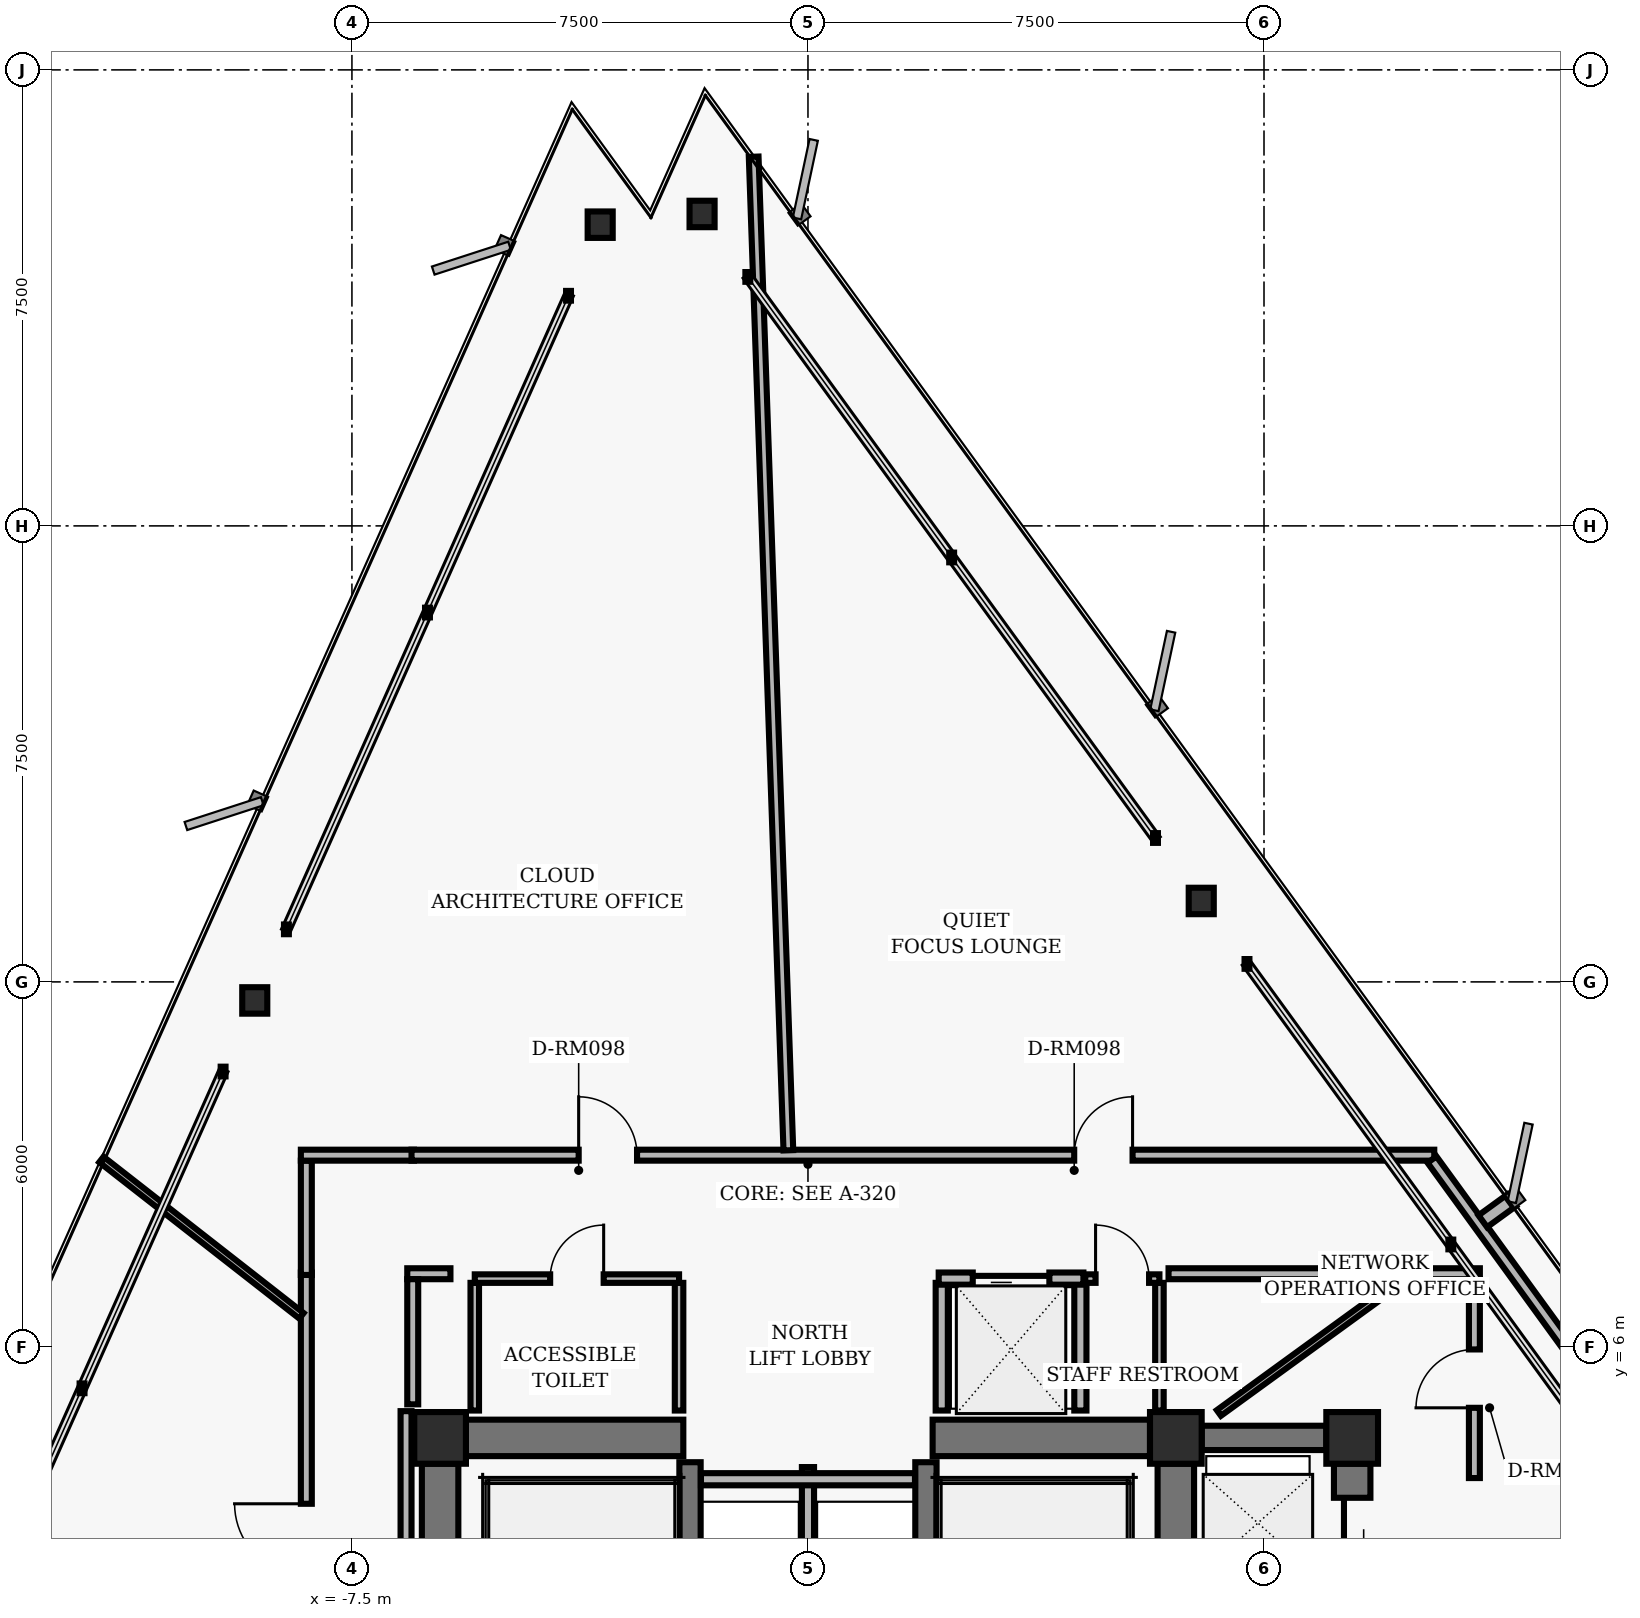
"""IFC4 building model, lengths in metres.
Left out: names, types, materials, properties, quantities, classifications, styles, units other than length and angle.
Written with IfcOpenShell. Run it as: python <this file> out.ifc"""

import sys

from ifc_helpers import new_model, si_unit, direction, frame, frame_2d, origin, origin_2d, place, context, subcontext, project, spatial, rectangle, hollow_rectangle, i_section, extrude, element, fill, save


model = new_model("IFC4")
c1 = context("Model", 3, precision=1e-05, world=origin(), true_north=direction((0.0, 1.0)))
c2 = subcontext(c1, "Body", "Model", "MODEL_VIEW")
j1 = project(units=[si_unit("LENGTHUNIT", "METRE"), si_unit("PLANEANGLEUNIT", "RADIAN")], contexts=[c1])
p1 = place(None, origin())
s1 = spatial("IfcSite", under=j1, at=p1, CompositionType="ELEMENT")
p2 = place(p1, origin())
s2 = spatial("IfcBuilding", under=s1, at=p2, CompositionType="ELEMENT")
p3 = place(p2, frame((0.0, 0.0, 104.64)))
s3 = spatial("IfcBuildingStorey", under=s2, at=p3, CompositionType="ELEMENT", Elevation=104.64)
for number, where, z_axis, x_axis in (
    (1, (-6.05, 4.5, 0.0), (0.0, 0.0, 1.0), (1.0, 0.0, 0.0)),
    (2, (6.05, 4.5, 0.0), (0.0, 0.0, 1.0), (1.0, 0.0, 0.0)),
    (3, (8.95, 4.5, 0.0), (0.0, 0.0, 1.0), (1.0, 0.0, 0.0)),
):
    element("IfcColumn", number, at=place(p3, frame(where, z_axis=z_axis, x_axis=x_axis)), inside=s3, PredefinedType="COLUMN", context=c2, shape_type="SweptSolid", body=[
        extrude(hollow_rectangle(XDim=0.85, YDim=0.85, WallThickness=0.055, InnerFilletRadius=0.02, OuterFilletRadius=0.04, at=origin_2d()), origin(), (0.0, 0.0, 1.0), 3.04),
    ])
for number, where, z_axis, x_axis in (
    (4, (-6.05, 0.425, 0.0), (0.0, 0.0, 1.0), (0.0, 1.0, 0.0)),
    (5, (6.05, 0.425, 0.0), (0.0, 0.0, 1.0), (0.0, 1.0, 0.0)),
):
    element("IfcWall", number, at=place(p3, frame(where, z_axis=z_axis, x_axis=x_axis)), inside=s3, PredefinedType="SHEAR", context=c2, shape_type="SweptSolid", body=[
        extrude(rectangle(XDim=3.65, YDim=0.6, at=frame_2d((1.825, 0.0))), origin(), (0.0, 0.0, 1.0), 2.788),
    ])
for number, where, z_axis, x_axis in (
    (6, (-1.94, -4.1, 0.0), (0.0, 0.0, 1.0), (0.0, 1.0, 0.0)),
    (7, (1.94, -4.1, 0.0), (0.0, 0.0, 1.0), (0.0, 1.0, 0.0)),
):
    element("IfcWall", number, at=place(p3, frame(where, z_axis=z_axis, x_axis=x_axis)), inside=s3, PredefinedType="SHEAR", context=c2, shape_type="SweptSolid", body=[
        extrude(rectangle(XDim=8.2, YDim=0.35, at=frame_2d((4.1, 0.0))), origin(), (0.0, 0.0, 1.0), 2.788),
    ])
for number, where, z_axis, x_axis in (
    (8, (-5.625, 4.5, 0.0), (0.0, 0.0, 1.0), (1.0, 0.0, 0.0)),
    (9, (2.05, 4.5, 0.0), (0.0, 0.0, 1.0), (1.0, 0.0, 0.0)),
):
    element("IfcWall", number, at=place(p3, frame(where, z_axis=z_axis, x_axis=x_axis)), inside=s3, PredefinedType="SHEAR", context=c2, shape_type="SweptSolid", body=[
        extrude(rectangle(XDim=3.575, YDim=0.6, at=frame_2d((1.788, 0.0))), origin(), (0.0, 0.0, 1.0), 2.788),
    ])
p4 = place(p3, frame((8.95, -3.875, 0.0), z_axis=(0.0, 0.0, 1.0), x_axis=(0.0, 1.0, 0.0)))
e10 = element("IfcWall", 10, at=p4, inside=s3, PredefinedType="SHEAR", context=c2, shape_type="SweptSolid", body=[
    extrude(rectangle(XDim=7.95, YDim=0.6, at=frame_2d((3.975, 0.0))), origin(), (0.0, 0.0, 1.0), 2.788),
])
p5 = place(p4, frame((0.55, 0.0, 0.0)))
e11 = element("IfcOpeningElement", 11, at=p5, cuts=e10, PredefinedType="OPENING", context=c2, shape_type="SweptSolid", body=[
    extrude(rectangle(XDim=1.06, YDim=2.04, at=frame_2d((0.53, 1.02))), frame((0.0, 0.31, 0.0), z_axis=(0.0, -1.0, 0.0), x_axis=(1.0, 0.0, 0.0)), (0.0, 0.0, 1.0), 0.62),
])
p6 = place(p4, frame((3.445, 0.0, 0.0)))
e12 = element("IfcOpeningElement", 12, at=p6, cuts=e10, PredefinedType="OPENING", context=c2, shape_type="SweptSolid", body=[
    extrude(rectangle(XDim=1.06, YDim=2.04, at=frame_2d((0.53, 1.02))), frame((0.0, 0.31, 0.0), z_axis=(0.0, -1.0, 0.0), x_axis=(1.0, 0.0, 0.0)), (0.0, 0.0, 1.0), 0.62),
])
p7 = place(p4, frame((6.33, 0.0, 0.0)))
e13 = element("IfcOpeningElement", 13, at=p7, cuts=e10, PredefinedType="OPENING", context=c2, shape_type="SweptSolid", body=[
    extrude(rectangle(XDim=1.06, YDim=2.04, at=frame_2d((0.53, 1.02))), frame((0.0, 0.31, 0.0), z_axis=(0.0, -1.0, 0.0), x_axis=(1.0, 0.0, 0.0)), (0.0, 0.0, 1.0), 0.62),
])
p8 = place(p3, frame((6.475, 4.5, 0.0), z_axis=(0.0, 0.0, 1.0), x_axis=(1.0, 0.0, 0.0)))
e14 = element("IfcWall", 14, at=p8, inside=s3, PredefinedType="SHEAR", context=c2, shape_type="SweptSolid", body=[
    extrude(rectangle(XDim=2.05, YDim=0.4, at=frame_2d((1.025, 0.0))), origin(), (0.0, 0.0, 1.0), 2.788),
])
for number, where, z_axis, x_axis in (
    (15, (6.468, 13.331, 0.0), (0.0, 0.0, 1.0), (1.0, 0.0, 0.0)),
    (16, (-1.742, 24.63, 0.0), (0.0, 0.0, 1.0), (1.0, 0.0, 0.0)),
    (17, (-3.417, 24.454, 0.0), (0.0, 0.0, 1.0), (1.0, 0.0, 0.0)),
    (18, (-9.098, 11.695, 0.0), (0.0, 0.0, 1.0), (1.0, 0.0, 0.0)),
):
    element("IfcColumn", number, at=place(p3, frame(where, z_axis=z_axis, x_axis=x_axis)), inside=s3, PredefinedType="COLUMN", context=c2, shape_type="SweptSolid", body=[
        extrude(i_section(OverallWidth=0.412, OverallDepth=0.435, WebThickness=0.036, FlangeThickness=0.057, FilletRadius=0.022, at=origin_2d()), origin(), (0.0, 0.0, 1.0), 3.04),
    ])
p9 = place(p3, frame((0.0, 1.25, 0.0), z_axis=(0.0, 0.0, 1.0), x_axis=(0.0, 1.0, 0.0)))
e19 = element("IfcWall", 19, at=p9, inside=s3, PredefinedType="PARTITIONING", context=c2, shape_type="SweptSolid", body=[
    extrude(rectangle(XDim=2.77, YDim=0.2, at=frame_2d((1.385, 0.0))), origin(), (0.0, 0.0, 1.0), 2.763),
])
p10 = place(p3, frame((-1.76, 3.82, 0.0), z_axis=(0.0, 0.0, 1.0), x_axis=(1.0, 0.0, 0.0)))
e20 = element("IfcWall", 20, at=p10, inside=s3, PredefinedType="PARTITIONING", context=c2, shape_type="SweptSolid", body=[
    extrude(rectangle(XDim=3.52, YDim=0.2, at=frame_2d((1.76, 0.0))), origin(), (0.0, 0.0, 1.0), 2.763),
])
p11 = place(p3, frame((2.2, 4.95, 0.0), z_axis=(0.0, 0.0, 1.0), x_axis=(0.0, 1.0, 0.0)))
e21 = element("IfcWall", 21, at=p11, inside=s3, PredefinedType="PARTITIONING", context=c2, shape_type="SweptSolid", body=[
    extrude(rectangle(XDim=2.1, YDim=0.2, at=frame_2d((1.05, 0.0))), origin(), (0.0, 0.0, 1.0), 2.132),
])
p12 = place(p3, frame((4.48, 4.95, 0.0), z_axis=(0.0, 0.0, 1.0), x_axis=(0.0, 1.0, 0.0)))
e22 = element("IfcWall", 22, at=p12, inside=s3, PredefinedType="PARTITIONING", context=c2, shape_type="SweptSolid", body=[
    extrude(rectangle(XDim=2.1, YDim=0.2, at=frame_2d((1.05, 0.0))), origin(), (0.0, 0.0, 1.0), 2.763),
])
p13 = place(p3, frame((2.15, 7.12, 0.0), z_axis=(0.0, 0.0, 1.0), x_axis=(1.0, 0.0, 0.0)))
e23 = element("IfcWall", 23, at=p13, inside=s3, PredefinedType="PARTITIONING", context=c2, shape_type="SweptSolid", body=[
    extrude(rectangle(XDim=2.38, YDim=0.2, at=frame_2d((1.19, 0.0))), origin(), (0.0, 0.0, 1.0), 2.763),
])
p14 = place(p13, frame((0.56, 0.0, 0.0)))
e24 = element("IfcOpeningElement", 24, at=p14, cuts=e23, PredefinedType="OPENING", context=c2, shape_type="SweptSolid", body=[
    extrude(rectangle(XDim=1.26, YDim=2.06, at=frame_2d((0.63, 1.03))), frame((0.0, 0.11, 0.0), z_axis=(0.0, -1.0, 0.0), x_axis=(1.0, 0.0, 0.0)), (0.0, 0.0, 1.0), 0.22),
])
for number, where, z_axis, x_axis in (
    (25, (-5.48, 4.95, 0.0), (0.0, 0.0, 1.0), (0.0, 1.0, 0.0)),
    (26, (-2.12, 4.95, 0.0), (0.0, 0.0, 1.0), (0.0, 1.0, 0.0)),
):
    element("IfcWall", number, at=place(p3, frame(where, z_axis=z_axis, x_axis=x_axis)), inside=s3, PredefinedType="PARTITIONING", context=c2, shape_type="SweptSolid", body=[
        extrude(rectangle(XDim=2.1, YDim=0.14, at=frame_2d((1.05, 0.0))), origin(), (0.0, 0.0, 1.0), 2.763),
    ])
p15 = place(p3, frame((-5.48, 7.12, 0.0), z_axis=(0.0, 0.0, 1.0), x_axis=(1.0, 0.0, 0.0)))
e27 = element("IfcWall", 27, at=p15, inside=s3, PredefinedType="PARTITIONING", context=c2, shape_type="SweptSolid", body=[
    extrude(rectangle(XDim=3.36, YDim=0.14, at=frame_2d((1.68, 0.0))), origin(), (0.0, 0.0, 1.0), 2.763),
])
p16 = place(p15, frame((1.24, 0.0, 0.0)))
e28 = element("IfcOpeningElement", 28, at=p16, cuts=e27, PredefinedType="OPENING", context=c2, shape_type="SweptSolid", body=[
    extrude(rectangle(XDim=0.88, YDim=2.02, at=frame_2d((0.44, 1.01))), frame((0.0, 0.08, 0.0), z_axis=(0.0, -1.0, 0.0), x_axis=(1.0, 0.0, 0.0)), (0.0, 0.0, 1.0), 0.16),
])
p17 = place(p3, frame((5.78, 4.95, 0.0), z_axis=(0.0, 0.0, 1.0), x_axis=(0.0, 1.0, 0.0)))
e29 = element("IfcWall", 29, at=p17, inside=s3, PredefinedType="PARTITIONING", context=c2, shape_type="SweptSolid", body=[
    extrude(rectangle(XDim=2.1, YDim=0.14, at=frame_2d((1.05, 0.0))), origin(), (0.0, 0.0, 1.0), 2.132),
])
p18 = place(p3, frame((4.56, 7.12, 0.0), z_axis=(0.0, 0.0, 1.0), x_axis=(1.0, 0.0, 0.0)))
e30 = element("IfcWall", 30, at=p18, inside=s3, PredefinedType="PARTITIONING", context=c2, shape_type="SweptSolid", body=[
    extrude(rectangle(XDim=1.22, YDim=0.14, at=frame_2d((0.61, 0.0))), origin(), (0.0, 0.0, 1.0), 2.763),
])
p19 = place(p18, frame((0.17, 0.0, 0.0)))
e31 = element("IfcOpeningElement", 31, at=p19, cuts=e30, PredefinedType="OPENING", context=c2, shape_type="SweptSolid", body=[
    extrude(rectangle(XDim=0.88, YDim=2.02, at=frame_2d((0.44, 1.01))), frame((0.0, 0.08, 0.0), z_axis=(0.0, -1.0, 0.0), x_axis=(1.0, 0.0, 0.0)), (0.0, 0.0, 1.0), 0.16),
])
p20 = place(p3, frame((-8.25, -7.22, 0.0), z_axis=(0.0, 0.0, 1.0), x_axis=(0.0, 1.0, 0.0)))
e32 = element("IfcWall", 32, at=p20, inside=s3, PredefinedType="PARTITIONING", context=c2, shape_type="SweptSolid", body=[
    extrude(rectangle(XDim=14.44, YDim=0.18, at=frame_2d((7.22, 0.0))), origin(), (0.0, 0.0, 1.0), 2.33),
])
p21 = place(p20, frame((3.038, 0.0, 0.0)))
e33 = element("IfcOpeningElement", 33, at=p21, cuts=e32, PredefinedType="OPENING", context=c2, shape_type="SweptSolid", body=[
    extrude(rectangle(XDim=0.96, YDim=2.02, at=frame_2d((0.48, 1.01))), frame((0.0, 0.1, 0.0), z_axis=(0.0, -1.0, 0.0), x_axis=(1.0, 0.0, 0.0)), (0.0, 0.0, 1.0), 0.2),
])
p22 = place(p20, frame((9.456, 0.0, 0.0)))
e34 = element("IfcOpeningElement", 34, at=p22, cuts=e32, PredefinedType="OPENING", context=c2, shape_type="SweptSolid", body=[
    extrude(rectangle(XDim=1.18, YDim=2.02, at=frame_2d((0.59, 1.01))), frame((0.0, 0.1, 0.0), z_axis=(0.0, -1.0, 0.0), x_axis=(1.0, 0.0, 0.0)), (0.0, 0.0, 1.0), 0.2),
])
p23 = place(p3, frame((-8.25, 7.18, 0.0), z_axis=(0.0, 0.0, 1.0), x_axis=(0.0, 1.0, 0.0)))
e35 = element("IfcWall", 35, at=p23, inside=s3, PredefinedType="PARTITIONING", context=c2, shape_type="SweptSolid", body=[
    extrude(rectangle(XDim=1.88, YDim=0.18, at=frame_2d((0.94, 0.0))), origin(), (0.0, 0.0, 1.0), 2.763),
])
p24 = place(p3, frame((-8.34, 9.15, 0.0), z_axis=(0.0, 0.0, 1.0), x_axis=(1.0, 0.0, 0.0)))
e36 = element("IfcWall", 36, at=p24, inside=s3, PredefinedType="PARTITIONING", context=c2, shape_type="SweptSolid", body=[
    extrude(rectangle(XDim=1.86, YDim=0.18, at=frame_2d((0.93, 0.0))), origin(), (0.0, 0.0, 1.0), 2.763),
])
p25 = place(p3, frame((-6.52, 9.15, 0.0), z_axis=(0.0, 0.0, 1.0), x_axis=(1.0, 0.0, 0.0)))
e37 = element("IfcWall", 37, at=p25, inside=s3, PredefinedType="PARTITIONING", context=c2, shape_type="SweptSolid", body=[
    extrude(rectangle(XDim=16.82, YDim=0.18, at=frame_2d((8.41, 0.0))), origin(), (0.0, 0.0, 1.0), 2.763),
])
p26 = place(p25, frame((10.898, 0.0, 0.0)))
e38 = element("IfcOpeningElement", 38, at=p26, cuts=e37, PredefinedType="OPENING", context=c2, shape_type="SweptSolid", body=[
    extrude(rectangle(XDim=0.96, YDim=2.02, at=frame_2d((0.48, 1.01))), frame((0.0, 0.1, 0.0), z_axis=(0.0, -1.0, 0.0), x_axis=(1.0, 0.0, 0.0)), (0.0, 0.0, 1.0), 0.2),
])
p27 = place(p25, frame((2.749, 0.0, 0.0)))
e39 = element("IfcOpeningElement", 39, at=p27, cuts=e37, PredefinedType="OPENING", context=c2, shape_type="SweptSolid", body=[
    extrude(rectangle(XDim=0.96, YDim=2.02, at=frame_2d((0.48, 1.01))), frame((0.0, 0.1, 0.0), z_axis=(0.0, -1.0, 0.0), x_axis=(1.0, 0.0, 0.0)), (0.0, 0.0, 1.0), 0.2),
])
p28 = place(p3, frame((10.263, 9.077, 0.0), z_axis=(0.0, 0.0, 1.0), x_axis=(0.587780951295, -0.809020119215, 0.0)))
e40 = element("IfcWall", 40, at=p28, inside=s3, PredefinedType="PARTITIONING", context=c2, shape_type="SweptSolid", body=[
    extrude(rectangle(XDim=7.469, YDim=0.18, at=frame_2d((3.734, 0.0))), origin(), (0.0, 0.0, 1.0), 2.763),
])
p29 = place(p3, frame((10.96, 3.84, 0.0), z_axis=(0.0, 0.0, 1.0), x_axis=(0.0, 1.0, 0.0)))
e41 = element("IfcWall", 41, at=p29, inside=s3, PredefinedType="PARTITIONING", context=c2, shape_type="SweptSolid", body=[
    extrude(rectangle(XDim=3.271, YDim=0.18, at=frame_2d((1.635, 0.0))), origin(), (0.0, 0.0, 1.0), 2.763),
])
p30 = place(p29, frame((1.155, 0.0, 0.0)))
e42 = element("IfcOpeningElement", 42, at=p30, cuts=e41, PredefinedType="OPENING", context=c2, shape_type="SweptSolid", body=[
    extrude(rectangle(XDim=0.96, YDim=2.02, at=frame_2d((0.48, 1.01))), frame((0.0, 0.1, 0.0), z_axis=(0.0, -1.0, 0.0), x_axis=(1.0, 0.0, 0.0)), (0.0, 0.0, 1.0), 0.2),
])
p31 = place(p3, frame((11.05, 7.2, 0.0), z_axis=(0.0, 0.0, 1.0), x_axis=(-1.0, 0.0, 0.0)))
e43 = element("IfcWall", 43, at=p31, inside=s3, PredefinedType="PARTITIONING", context=c2, shape_type="SweptSolid", body=[
    extrude(rectangle(XDim=5.12, YDim=0.18, at=frame_2d((2.56, 0.0))), origin(), (0.0, 0.0, 1.0), 2.763),
])
p32 = place(p3, frame((-5.88, 7.2, 0.0), z_axis=(0.0, 0.0, 1.0), x_axis=(-1.0, 0.0, 0.0)))
e44 = element("IfcWall", 44, at=p32, inside=s3, PredefinedType="PARTITIONING", context=c2, shape_type="SweptSolid", body=[
    extrude(rectangle(XDim=0.71, YDim=0.18, at=frame_2d((0.355, 0.0))), origin(), (0.0, 0.0, 1.0), 2.763),
])
p33 = place(p3, frame((-6.5, 7.11, 0.0), z_axis=(0.0, 0.0, 1.0), x_axis=(0.0, -1.0, 0.0)))
e45 = element("IfcWall", 45, at=p33, inside=s3, PredefinedType="PARTITIONING", context=c2, shape_type="SweptSolid", body=[
    extrude(rectangle(XDim=2.058, YDim=0.18, at=frame_2d((1.029, 0.0))), origin(), (0.0, 0.0, 1.0), 2.763),
])
p34 = place(p3, frame((-6.61, 4.94, 0.0), z_axis=(0.0, 0.0, 1.0), x_axis=(0.0, -1.0, 0.0)))
e46 = element("IfcWall", 46, at=p34, inside=s3, PredefinedType="PARTITIONING", context=c2, shape_type="SweptSolid", body=[
    extrude(rectangle(XDim=9.46, YDim=0.18, at=frame_2d((4.73, 0.0))), origin(), (0.0, 0.0, 1.0), 2.763),
])
p35 = place(p3, frame((6.758, 4.91, 0.0), z_axis=(0.0, 0.0, 1.0), x_axis=(0.808985911181, 0.58782803226, 0.0)))
e47 = element("IfcWall", 47, at=p35, inside=s3, PredefinedType="MOVABLE", context=c2, shape_type="SweptSolid", body=[
    extrude(rectangle(XDim=3.76, YDim=0.115, at=frame_2d((1.88, 0.0))), origin(), (0.0, 0.0, 1.0), 2.763),
])
p36 = place(p3, frame((11.098, 8.063, 0.0), z_axis=(0.0, 0.0, 1.0), x_axis=(0.809093866449, 0.587679432408, 0.0)))
e48 = element("IfcWall", 48, at=p36, inside=s3, PredefinedType="PARTITIONING", context=c2, shape_type="SweptSolid", body=[
    extrude(rectangle(XDim=0.59, YDim=0.24, at=frame_2d((0.295, 0.0))), origin(), (0.0, 0.0, 1.0), 2.763),
])
p37 = place(p3, frame((-0.322, 9.23, 0.0), z_axis=(0.0, 0.0, 1.0), x_axis=(-0.034907078812, 0.999390562217, 0.0)))
e49 = element("IfcWall", 49, at=p37, inside=s3, PredefinedType="PARTITIONING", context=c2, shape_type="SweptSolid", body=[
    extrude(rectangle(XDim=16.352, YDim=0.16, at=frame_2d((8.176, 0.0))), origin(), (0.0, 0.0, 1.0), 2.132),
])
p38 = place(p3, frame((-8.33, 6.508, 0.0), z_axis=(0.0, 0.0, 1.0), x_axis=(-0.787993347372, 0.615683753641, 0.0)))
e50 = element("IfcWall", 50, at=p38, inside=s3, PredefinedType="MOVABLE", context=c2, shape_type="SweptSolid", body=[
    extrude(rectangle(XDim=4.176, YDim=0.115, at=frame_2d((2.088, 0.0))), origin(), (0.0, 0.0, 1.0), 2.763),
])
p39 = place(p14, origin())
e51 = element("IfcDoor", 51, at=p39, inside=s3, OperationType="SLIDING_TO_LEFT", PredefinedType="DOOR", context=c2, shape_type="SweptSolid", body=[
    extrude(rectangle(XDim=1.26, YDim=2.06, at=frame_2d((0.63, 1.03))), frame((0.0, 0.025, 0.0), z_axis=(0.0, -1.0, 0.0), x_axis=(1.0, 0.0, 0.0)), (0.0, 0.0, 1.0), 0.05),
])
fill(e24, e51)
p40 = place(p16, origin())
e52 = element("IfcDoor", 52, at=p40, inside=s3, OperationType="SINGLE_SWING_RIGHT", PredefinedType="DOOR", context=c2, shape_type="SweptSolid", body=[
    extrude(rectangle(XDim=0.88, YDim=2.02, at=frame_2d((0.44, 1.01))), frame((0.0, 0.025, 0.0), z_axis=(0.0, -1.0, 0.0), x_axis=(1.0, 0.0, 0.0)), (0.0, 0.0, 1.0), 0.05),
])
fill(e28, e52)
p41 = place(p19, origin())
e53 = element("IfcDoor", 53, at=p41, inside=s3, OperationType="SINGLE_SWING_LEFT", PredefinedType="DOOR", context=c2, shape_type="SweptSolid", body=[
    extrude(rectangle(XDim=0.88, YDim=2.02, at=frame_2d((0.44, 1.01))), frame((0.0, 0.025, 0.0), z_axis=(0.0, -1.0, 0.0), x_axis=(1.0, 0.0, 0.0)), (0.0, 0.0, 1.0), 0.05),
])
fill(e31, e53)
p42 = place(p7, origin())
e54 = element("IfcDoor", 54, at=p42, inside=s3, OperationType="SLIDING_TO_LEFT", PredefinedType="DOOR", context=c2, shape_type="SweptSolid", body=[
    extrude(rectangle(XDim=1.06, YDim=2.04, at=frame_2d((0.53, 1.02))), frame((0.0, 0.025, 0.0), z_axis=(0.0, -1.0, 0.0), x_axis=(1.0, 0.0, 0.0)), (0.0, 0.0, 1.0), 0.05),
])
fill(e13, e54)
p43 = place(p30, origin())
e55 = element("IfcDoor", 55, at=p43, inside=s3, OperationType="SINGLE_SWING_LEFT", PredefinedType="DOOR", context=c2, shape_type="SweptSolid", body=[
    extrude(rectangle(XDim=0.96, YDim=2.02, at=frame_2d((0.48, 1.01))), frame((0.0, 0.025, 0.0), z_axis=(0.0, -1.0, 0.0), x_axis=(1.0, 0.0, 0.0)), (0.0, 0.0, 1.0), 0.05),
])
fill(e42, e55)
p44 = place(p26, origin())
e56 = element("IfcDoor", 56, at=p44, inside=s3, OperationType="SINGLE_SWING_RIGHT", PredefinedType="DOOR", context=c2, shape_type="SweptSolid", body=[
    extrude(rectangle(XDim=0.96, YDim=2.02, at=frame_2d((0.48, 1.01))), frame((0.0, 0.025, 0.0), z_axis=(0.0, -1.0, 0.0), x_axis=(1.0, 0.0, 0.0)), (0.0, 0.0, 1.0), 0.05),
])
fill(e38, e56)
p45 = place(p27, origin())
e57 = element("IfcDoor", 57, at=p45, inside=s3, OperationType="SINGLE_SWING_LEFT", PredefinedType="DOOR", context=c2, shape_type="SweptSolid", body=[
    extrude(rectangle(XDim=0.96, YDim=2.02, at=frame_2d((0.48, 1.01))), frame((0.0, 0.025, 0.0), z_axis=(0.0, -1.0, 0.0), x_axis=(1.0, 0.0, 0.0)), (0.0, 0.0, 1.0), 0.05),
])
fill(e39, e57)
p46 = place(p22, origin())
e58 = element("IfcDoor", 58, at=p46, inside=s3, OperationType="SINGLE_SWING_RIGHT", PredefinedType="DOOR", context=c2, shape_type="SweptSolid", body=[
    extrude(rectangle(XDim=1.18, YDim=2.02, at=frame_2d((0.59, 1.01))), frame((0.0, 0.025, 0.0), z_axis=(0.0, -1.0, 0.0), x_axis=(1.0, 0.0, 0.0)), (0.0, 0.0, 1.0), 0.05),
])
fill(e34, e58)
save(model, sys.argv[1])
